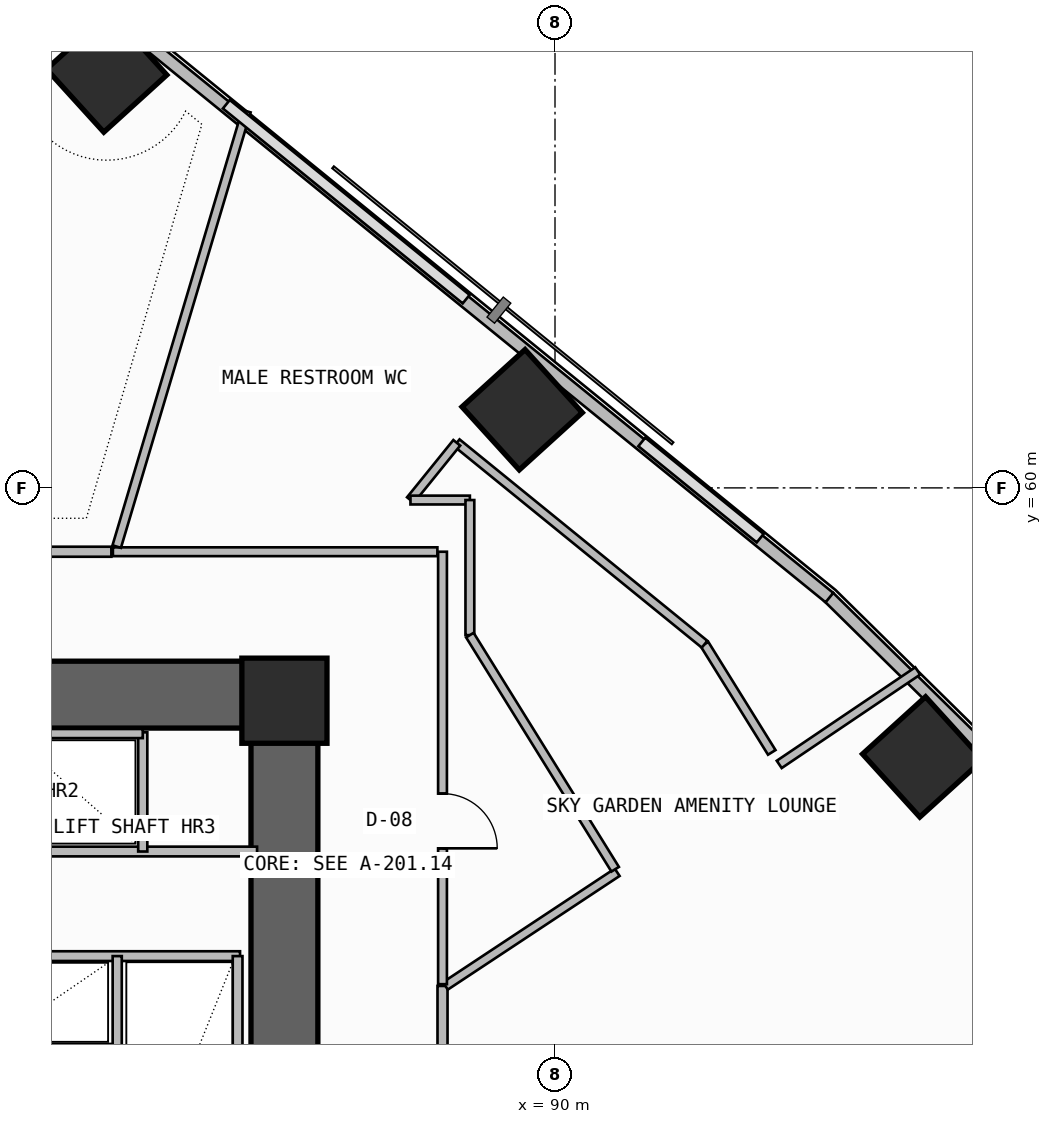
"""IFC4 building model, lengths in metres.
Left out: names, types, materials, properties, quantities, classifications, styles, units other than length and angle.
Written with IfcOpenShell. Run it as: python <this file> out.ifc"""

import sys

from ifc_helpers import new_model, si_unit, direction, frame, frame_2d, origin, origin_2d, place, context, subcontext, project, spatial, rectangle, extrude, element, fill, save


model = new_model("IFC4")
c1 = context("Model", 3, precision=1e-05, world=origin(), true_north=direction((0.0, 1.0)))
c2 = subcontext(c1, "Body", "Model", "MODEL_VIEW")
j1 = project(units=[si_unit("LENGTHUNIT", "METRE"), si_unit("PLANEANGLEUNIT", "RADIAN")], contexts=[c1])
p1 = place(None, origin())
s1 = spatial("IfcSite", under=j1, at=p1, CompositionType="ELEMENT")
p2 = place(p1, origin())
s2 = spatial("IfcBuilding", under=s1, at=p2, CompositionType="ELEMENT")
p3 = place(p2, frame((0.0, 0.0, 48.3)))
s3 = spatial("IfcBuildingStorey", under=s2, at=p3, CompositionType="ELEMENT", Elevation=48.3)
p4 = place(p3, frame((71.8, 56.6, -0.26), z_axis=(0.0, 0.0, 1.0), x_axis=(1.0, 0.0, 0.0)))
e1 = element("IfcWall", 1, at=p4, inside=s3, PredefinedType="SHEAR", context=c2, shape_type="SweptSolid", body=[
    extrude(rectangle(XDim=14.3, YDim=1.1, at=frame_2d((7.15, 0.0))), origin(), (0.0, 0.0, 1.0), 3.66),
])
p5 = place(p3, frame((85.55, 47.6, -0.26), z_axis=(0.0, 0.0, 1.0), x_axis=(0.0, 1.0, 0.0)))
e2 = element("IfcWall", 2, at=p5, inside=s3, PredefinedType="SHEAR", context=c2, shape_type="SweptSolid", body=[
    extrude(rectangle(XDim=8.45, YDim=1.1, at=frame_2d((4.225, 0.0))), origin(), (0.0, 0.0, 1.0), 3.66),
])
for number, where, z_axis, x_axis in (
    (3, (85.55, 56.5, 0.0), (0.0, 0.0, 1.0), (1.0, 0.0, 0.0)),
    (4, (96.047, 55.576, 0.0), (0.0, 0.0, 1.0), (0.74, 0.672, 0.0)),
    (5, (89.46, 61.285, 0.0), (0.0, 0.0, 1.0), (0.74, 0.672, 0.0)),
    (6, (82.627, 66.839, 0.0), (0.0, 0.0, 1.0), (0.74, 0.672, 0.0)),
):
    element("IfcColumn", number, at=place(p3, frame(where, z_axis=z_axis, x_axis=x_axis)), inside=s3, PredefinedType="COLUMN", context=c2, shape_type="SweptSolid", body=[
        extrude(rectangle(XDim=1.4, YDim=1.4, at=origin_2d()), origin(), (0.0, 0.0, 1.0), 3.6),
    ])
p6 = place(p3, frame((120.254, 32.848, 0.0), z_axis=(0.0, 0.0, 1.0), x_axis=(-0.71254385441, 0.701627576099, 0.0)))
e7 = element("IfcWall", 7, at=p6, inside=s3, PredefinedType="PARAPET", context=c2, shape_type="SweptSolid", body=[
    extrude(rectangle(XDim=36.142, YDim=0.2, at=frame_2d((18.071, 0.0))), origin(), (0.0, 0.0, 1.0), 1.15),
])
p7 = place(p3, frame((94.513, 58.196, 0.0), z_axis=(0.0, 0.0, 1.0), x_axis=(-0.776001602097, 0.630730935933, 0.0)))
e8 = element("IfcWall", 8, at=p7, inside=s3, PredefinedType="PARAPET", context=c2, shape_type="SweptSolid", body=[
    extrude(rectangle(XDim=36.148, YDim=0.2, at=frame_2d((18.074, 0.0))), origin(), (0.0, 0.0, 1.0), 1.15),
])
p8 = place(p3, frame((80.6, 52.3, 0.0), z_axis=(0.0, 0.0, 1.0), x_axis=(1.0, 0.0, 0.0)))
e9 = element("IfcWall", 9, at=p8, inside=s3, PredefinedType="SOLIDWALL", context=c2, shape_type="SweptSolid", body=[
    extrude(rectangle(XDim=4.22, YDim=0.16, at=frame_2d((2.11, 0.0))), origin(), (0.0, 0.0, 1.0), 3.4),
])
p9 = place(p3, frame((80.6, 50.78, 0.0), z_axis=(0.0, 0.0, 1.0), x_axis=(1.0, 0.0, 0.0)))
e10 = element("IfcWall", 10, at=p9, inside=s3, PredefinedType="PLUMBINGWALL", context=c2, shape_type="SweptSolid", body=[
    extrude(rectangle(XDim=2.2, YDim=0.15, at=frame_2d((1.1, 0.0))), origin(), (0.0, 0.0, 1.0), 3.4),
])
p10 = place(p3, frame((82.8, 47.7, 0.0), z_axis=(0.0, 0.0, 1.0), x_axis=(0.0, 1.0, 0.0)))
e11 = element("IfcWall", 11, at=p10, inside=s3, PredefinedType="PLUMBINGWALL", context=c2, shape_type="SweptSolid", body=[
    extrude(rectangle(XDim=4.6, YDim=0.15, at=frame_2d((2.3, 0.0))), origin(), (0.0, 0.0, 1.0), 3.4),
])
p11 = place(p3, frame((84.78, 47.7, 0.0), z_axis=(0.0, 0.0, 1.0), x_axis=(0.0, 1.0, 0.0)))
e12 = element("IfcWall", 12, at=p11, inside=s3, PredefinedType="SOLIDWALL", context=c2, shape_type="SweptSolid", body=[
    extrude(rectangle(XDim=4.6, YDim=0.16, at=frame_2d((2.3, 0.0))), origin(), (0.0, 0.0, 1.0), 3.4),
])
p12 = place(p3, frame((73.02, 54.02, 0.0), z_axis=(0.0, 0.0, 1.0), x_axis=(1.0, 0.0, 0.0)))
e13 = element("IfcWall", 13, at=p12, inside=s3, PredefinedType="SOLIDWALL", context=c2, shape_type="SweptSolid", body=[
    extrude(rectangle(XDim=12.08, YDim=0.16, at=frame_2d((6.04, 0.0))), origin(), (0.0, 0.0, 1.0), 3.4),
])
p13 = place(p3, frame((83.22, 54.02, 0.0), z_axis=(0.0, 0.0, 1.0), x_axis=(0.0, 1.0, 0.0)))
e14 = element("IfcWall", 14, at=p13, inside=s3, PredefinedType="SOLIDWALL", context=c2, shape_type="SweptSolid", body=[
    extrude(rectangle(XDim=1.96, YDim=0.15, at=frame_2d((0.98, 0.0))), origin(), (0.0, 0.0, 1.0), 3.4),
])
p14 = place(p3, frame((76.52, 55.96, 0.0), z_axis=(0.0, 0.0, 1.0), x_axis=(1.0, 0.0, 0.0)))
e15 = element("IfcWall", 15, at=p14, inside=s3, PredefinedType="SOLIDWALL", context=c2, shape_type="SweptSolid", body=[
    extrude(rectangle(XDim=6.7, YDim=0.15, at=frame_2d((3.35, 0.0))), origin(), (0.0, 0.0, 1.0), 3.4),
])
p15 = place(p3, frame((88.15, 44.572, 0.0), z_axis=(0.0, 0.0, 1.0), x_axis=(0.0, 1.0, 0.0)))
e16 = element("IfcWall", 16, at=p15, inside=s3, PredefinedType="PARTITIONING", context=c2, shape_type="SweptSolid", body=[
    extrude(rectangle(XDim=7.238, YDim=0.165, at=frame_2d((3.619, 0.0))), origin(), (0.0, 0.0, 1.0), 2.785),
])
p16 = place(p15, frame((2.819, 0.0, 0.0)))
e17 = element("IfcOpeningElement", 17, at=p16, cuts=e16, PredefinedType="OPENING", context=c2, shape_type="SweptSolid", body=[
    extrude(rectangle(XDim=1.6, YDim=2.3, at=frame_2d((0.8, 1.15))), frame((0.0, 0.093, 0.0), z_axis=(0.0, -1.0, 0.0), x_axis=(1.0, 0.0, 0.0)), (0.0, 0.0, 1.0), 0.185),
])
p17 = place(p3, frame((88.197, 51.81, 0.0), z_axis=(0.0, 0.0, 1.0), x_axis=(0.834029749889, 0.551719472468, 0.0)))
e18 = element("IfcWall", 18, at=p17, inside=s3, PredefinedType="PARTITIONING", context=c2, shape_type="SweptSolid", body=[
    extrude(rectangle(XDim=3.387, YDim=0.145, at=frame_2d((1.694, 0.0))), origin(), (0.0, 0.0, 1.0), 3.4),
])
p18 = place(p3, frame((93.688, 55.452, 0.0), z_axis=(0.0, 0.0, 1.0), x_axis=(0.82889296356, 0.559407235349, 0.0)))
e19 = element("IfcWall", 19, at=p18, inside=s3, PredefinedType="PARTITIONING", context=c2, shape_type="SweptSolid", body=[
    extrude(rectangle(XDim=2.748, YDim=0.145, at=frame_2d((1.374, 0.0))), origin(), (0.0, 0.0, 1.0), 2.785),
])
p19 = place(p3, frame((88.15, 51.838, 0.0), z_axis=(0.0, 0.0, 1.0), x_axis=(0.0, 1.0, 0.0)))
e20 = element("IfcWall", 20, at=p19, inside=s3, PredefinedType="PARTITIONING", context=c2, shape_type="SweptSolid", body=[
    extrude(rectangle(XDim=7.112, YDim=0.145, at=frame_2d((3.556, 0.0))), origin(), (0.0, 0.0, 1.0), 3.4),
])
p20 = place(p19, frame((2.234, 0.0, 0.0)))
e21 = element("IfcOpeningElement", 21, at=p20, cuts=e20, PredefinedType="OPENING", context=c2, shape_type="SweptSolid", body=[
    extrude(rectangle(XDim=0.9, YDim=2.1, at=frame_2d((0.45, 1.05))), frame((0.0, 0.083, 0.0), z_axis=(0.0, -1.0, 0.0), x_axis=(1.0, 0.0, 0.0)), (0.0, 0.0, 1.0), 0.165),
])
p21 = place(p3, frame((88.065, 58.95, 0.0), z_axis=(0.0, 0.0, 1.0), x_axis=(-1.0, 0.0, 0.0)))
e22 = element("IfcWall", 22, at=p21, inside=s3, PredefinedType="PARTITIONING", context=c2, shape_type="SweptSolid", body=[
    extrude(rectangle(XDim=5.336, YDim=0.145, at=frame_2d((2.668, 0.0))), origin(), (0.0, 0.0, 1.0), 2.785),
])
p22 = place(p3, frame((82.792, 59.034, 0.0), z_axis=(0.0, 0.0, 1.0), x_axis=(0.285401878516, 0.958407933888, 0.0)))
e23 = element("IfcWall", 23, at=p22, inside=s3, PredefinedType="PARTITIONING", context=c2, shape_type="SweptSolid", body=[
    extrude(rectangle(XDim=7.472, YDim=0.145, at=frame_2d((3.736, 0.0))), origin(), (0.0, 0.0, 1.0), 2.785),
])
p23 = place(p3, frame((82.704, 58.95, 0.0), z_axis=(0.0, 0.0, 1.0), x_axis=(-1.0, 0.0, 0.0)))
e24 = element("IfcWall", 24, at=p23, inside=s3, PredefinedType="PARTITIONING", context=c2, shape_type="SweptSolid", body=[
    extrude(rectangle(XDim=9.737, YDim=0.165, at=frame_2d((4.869, 0.0))), origin(), (0.0, 0.0, 1.0), 3.4),
])
p24 = place(p23, frame((4.369, 0.0, 0.0)))
e25 = element("IfcOpeningElement", 25, at=p24, cuts=e24, PredefinedType="OPENING", context=c2, shape_type="SweptSolid", body=[
    extrude(rectangle(XDim=1.0, YDim=2.2, at=frame_2d((0.5, 1.1))), frame((0.0, 0.093, 0.0), z_axis=(0.0, -1.0, 0.0), x_axis=(1.0, 0.0, 0.0)), (0.0, 0.0, 1.0), 0.185),
])
p25 = place(p3, frame((93.565, 55.65, 0.0), z_axis=(0.0, 0.0, 1.0), x_axis=(-0.527618202131, 0.849481625923, 0.0)))
e26 = element("IfcWall", 26, at=p25, inside=s3, PredefinedType="PARTITIONING", context=c2, shape_type="SweptSolid", body=[
    extrude(rectangle(XDim=2.094, YDim=0.145, at=frame_2d((1.047, 0.0))), origin(), (0.0, 0.0, 1.0), 3.4),
])
p26 = place(p3, frame((92.46, 57.429, 0.0), z_axis=(0.0, 0.0, 1.0), x_axis=(-0.775983159792, 0.630753625213, 0.0)))
e27 = element("IfcWall", 27, at=p26, inside=s3, PredefinedType="PARTITIONING", context=c2, shape_type="SweptSolid", body=[
    extrude(rectangle(XDim=5.252, YDim=0.145, at=frame_2d((2.626, 0.0))), origin(), (0.0, 0.0, 1.0), 3.4),
])
p27 = place(p3, frame((88.385, 60.742, 0.0), z_axis=(0.0, 0.0, 1.0), x_axis=(-0.628914048691, -0.777474835193, 0.0)))
e28 = element("IfcWall", 28, at=p27, inside=s3, PredefinedType="PARTITIONING", context=c2, shape_type="SweptSolid", body=[
    extrude(rectangle(XDim=1.211, YDim=0.145, at=frame_2d((0.605, 0.0))), origin(), (0.0, 0.0, 1.0), 3.4),
])
p28 = place(p3, frame((87.623, 59.8, 0.0), z_axis=(0.0, 0.0, 1.0), x_axis=(1.0, 0.0, 0.0)))
e29 = element("IfcWall", 29, at=p28, inside=s3, PredefinedType="PARTITIONING", context=c2, shape_type="SweptSolid", body=[
    extrude(rectangle(XDim=0.977, YDim=0.145, at=frame_2d((0.489, 0.0))), origin(), (0.0, 0.0, 1.0), 3.4),
])
p29 = place(p3, frame((88.6, 59.8, 0.0), z_axis=(0.0, 0.0, 1.0), x_axis=(0.0, -1.0, 0.0)))
e30 = element("IfcWall", 30, at=p29, inside=s3, PredefinedType="PARTITIONING", context=c2, shape_type="SweptSolid", body=[
    extrude(rectangle(XDim=2.222, YDim=0.145, at=frame_2d((1.111, 0.0))), origin(), (0.0, 0.0, 1.0), 3.4),
])
p30 = place(p3, frame((88.6, 57.578, 0.0), z_axis=(0.0, 0.0, 1.0), x_axis=(0.527337377714, -0.849655983363, 0.0)))
e31 = element("IfcWall", 31, at=p30, inside=s3, PredefinedType="PARTITIONING", context=c2, shape_type="SweptSolid", body=[
    extrude(rectangle(XDim=4.531, YDim=0.145, at=frame_2d((2.266, 0.0))), origin(), (0.0, 0.0, 1.0), 3.4),
])
p31 = place(p20, frame((0.9, 0.0, 0.0), z_axis=(0.0, 0.0, 1.0), x_axis=(-1.0, 0.0, 0.0)))
e32 = element("IfcDoor", 32, at=p31, inside=s3, OperationType="SINGLE_SWING_RIGHT", PredefinedType="DOOR", context=c2, shape_type="SweptSolid", body=[
    extrude(rectangle(XDim=0.9, YDim=2.1, at=frame_2d((0.45, 1.05))), frame((0.0, 0.025, 0.0), z_axis=(0.0, -1.0, 0.0), x_axis=(1.0, 0.0, 0.0)), (0.0, 0.0, 1.0), 0.05),
])
fill(e21, e32)
save(model, sys.argv[1])
